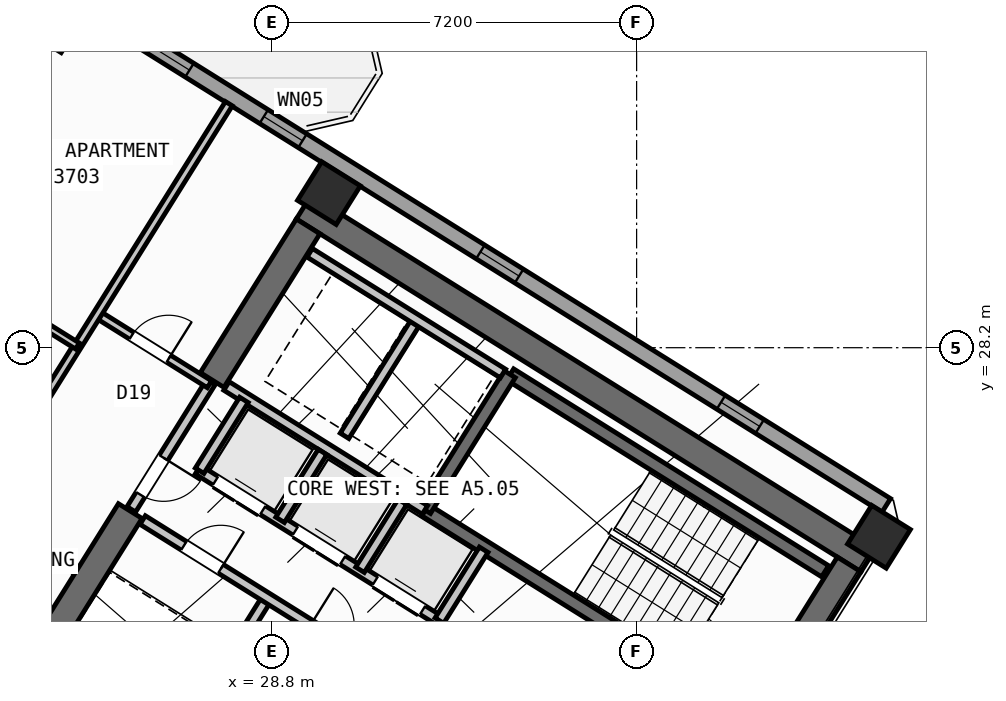
"""IFC4 building model, lengths in metres.
Left out: names, types, materials, properties, quantities, classifications, styles, units other than length and angle.
Written with IfcOpenShell. Run it as: python <this file> out.ifc"""

import sys

from ifc_helpers import new_model, si_unit, direction, frame, frame_2d, origin, origin_2d, place, context, subcontext, project, spatial, rectangle, hollow_rectangle, extrude, source, transform, mapped, element, fill, save


model = new_model("IFC4")
c1 = context("Model", 3, precision=1e-05, world=origin(), true_north=direction((0.0, 1.0)))
c2 = subcontext(c1, "Body", "Model", "MODEL_VIEW")
j1 = project(units=[si_unit("LENGTHUNIT", "METRE"), si_unit("PLANEANGLEUNIT", "RADIAN")], contexts=[c1])
p1 = place(None, origin())
s1 = spatial("IfcSite", under=j1, at=p1, CompositionType="ELEMENT")
p2 = place(p1, origin())
s2 = spatial("IfcBuilding", under=s1, at=p2, CompositionType="ELEMENT")
p3 = place(p2, frame((0.0, 0.0, 147.9)))
s3 = spatial("IfcBuildingStorey", under=s2, at=p3, CompositionType="ELEMENT", Elevation=147.9)
p4 = place(p3, frame((40.573, 24.01, 0.0), z_axis=(0.0, 0.0, 1.0), x_axis=(-0.848047359947, 0.529920442413, 0.0)))
e1 = element("IfcWall", 1, at=p4, inside=s3, PredefinedType="SHEAR", context=c2, shape_type="SweptSolid", body=[
    extrude(rectangle(XDim=13.14, YDim=0.55, at=frame_2d((6.57, 0.0))), origin(), (0.0, 0.0, 1.0), 3.35),
])
p5 = place(p3, frame((40.194, 23.922, 0.0), z_axis=(0.0, 0.0, 1.0), x_axis=(-0.529888438328, -0.848067357541, 0.0)))
e2 = element("IfcWall", 2, at=p5, inside=s3, PredefinedType="SHEAR", context=c2, shape_type="SweptSolid", body=[
    extrude(rectangle(XDim=3.575, YDim=0.55, at=frame_2d((1.788, 0.0))), origin(), (0.0, 0.0, 1.0), 3.35),
])
p6 = place(p3, frame((29.517, 30.594, 0.0), z_axis=(0.0, 0.0, 1.0), x_axis=(-0.529906864564, -0.848055844204, 0.0)))
e3 = element("IfcWall", 3, at=p6, inside=s3, PredefinedType="SHEAR", context=c2, shape_type="SweptSolid", body=[
    extrude(rectangle(XDim=3.575, YDim=0.55, at=frame_2d((1.788, 0.0))), origin(), (0.0, 0.0, 1.0), 3.35),
])
p7 = place(p3, frame((26.007, 24.976, 0.0), z_axis=(0.0, 0.0, 1.0), x_axis=(-0.529923795287, -0.848045264823, 0.0)))
e4 = element("IfcWall", 4, at=p7, inside=s3, PredefinedType="SHEAR", context=c2, shape_type="SweptSolid", body=[
    extrude(rectangle(XDim=6.425, YDim=0.55, at=frame_2d((3.212, 0.0))), origin(), (0.0, 0.0, 1.0), 3.35),
])
m1 = source(origin(), c2, "Body", "SweptSolid", [
    extrude(hollow_rectangle(XDim=0.9, YDim=0.9, WallThickness=0.036, at=origin_2d()), origin(), (0.0, 0.0, 1.0), 3.6),
])
for number, where, z_axis, x_axis in (
    (5, (40.783, 24.469, 0.0), (0.0, 0.0, 1.0), (-0.848, 0.53, 0.0)),
    (6, (29.928, 31.251, 0.0), (0.0, 0.0, 1.0), (-0.848, 0.53, 0.0)),
    (7, (24.5, 34.643, 0.0), (0.0, 0.0, 1.0), (-0.848, 0.53, 0.0)),
):
    element("IfcColumn", number, at=place(p3, frame(where, z_axis=z_axis, x_axis=x_axis)), inside=s3, PredefinedType="COLUMN", context=c2, shape_type="MappedRepresentation", body=[
        mapped(m1, transform((0.0, 0.0, 0.0), scale=1.0)),
    ])
p8 = place(p3, frame((29.268, 6.429, 0.0), z_axis=(0.0, 0.0, 1.0), x_axis=(-0.848049971435, 0.529916263149, 0.0)))
e8 = element("IfcWall", 8, at=p8, inside=s3, PredefinedType="STANDARD", context=c2, shape_type="SweptSolid", body=[
    extrude(rectangle(XDim=31.588, YDim=0.32, at=frame_2d((15.794, 0.0))), origin(), (0.0, 0.0, 1.0), 3.35),
])
p9 = place(p8, frame((16.362, 0.0, 0.0)))
e9 = element("IfcOpeningElement", 9, at=p9, cuts=e8, PredefinedType="OPENING", context=c2, shape_type="SweptSolid", body=[
    extrude(rectangle(XDim=1.2, YDim=2.15, at=frame_2d((0.6, 1.075))), frame((0.0, 0.17, 0.0), z_axis=(0.0, -1.0, 0.0), x_axis=(1.0, 0.0, 0.0)), (0.0, 0.0, 1.0), 0.34),
])
p10 = place(p8, frame((2.989, 0.0, 0.8)))
e10 = element("IfcOpeningElement", 10, at=p10, cuts=e8, PredefinedType="OPENING", context=c2, shape_type="SweptSolid", body=[
    extrude(rectangle(XDim=2.1, YDim=1.55, at=frame_2d((1.05, 0.775))), frame((0.0, 0.17, 0.0), z_axis=(0.0, -1.0, 0.0), x_axis=(1.0, 0.0, 0.0)), (0.0, 0.0, 1.0), 0.34),
])
p11 = place(p8, frame((8.359, 0.0, 0.8)))
e11 = element("IfcOpeningElement", 11, at=p11, cuts=e8, PredefinedType="OPENING", context=c2, shape_type="SweptSolid", body=[
    extrude(rectangle(XDim=2.1, YDim=1.55, at=frame_2d((1.05, 0.775))), frame((0.0, 0.17, 0.0), z_axis=(0.0, -1.0, 0.0), x_axis=(1.0, 0.0, 0.0)), (0.0, 0.0, 1.0), 0.34),
])
p12 = place(p8, frame((13.284, 0.0, 0.95)))
e12 = element("IfcOpeningElement", 12, at=p12, cuts=e8, PredefinedType="OPENING", context=c2, shape_type="SweptSolid", body=[
    extrude(rectangle(XDim=1.2, YDim=1.4, at=frame_2d((0.6, 0.7))), frame((0.0, 0.17, 0.0), z_axis=(0.0, -1.0, 0.0), x_axis=(1.0, 0.0, 0.0)), (0.0, 0.0, 1.0), 0.34),
])
p13 = place(p8, frame((29.188, 0.0, 0.95)))
e13 = element("IfcOpeningElement", 13, at=p13, cuts=e8, PredefinedType="OPENING", context=c2, shape_type="SweptSolid", body=[
    extrude(rectangle(XDim=1.2, YDim=1.4, at=frame_2d((0.6, 0.7))), frame((0.0, 0.17, 0.0), z_axis=(0.0, -1.0, 0.0), x_axis=(1.0, 0.0, 0.0)), (0.0, 0.0, 1.0), 0.34),
])
p14 = place(p8, frame((19.674, 0.0, 1.0)))
e14 = element("IfcOpeningElement", 14, at=p14, cuts=e8, PredefinedType="OPENING", context=c2, shape_type="SweptSolid", body=[
    extrude(rectangle(XDim=0.9, YDim=1.25, at=frame_2d((0.45, 0.625))), frame((0.0, 0.17, 0.0), z_axis=(0.0, -1.0, 0.0), x_axis=(1.0, 0.0, 0.0)), (0.0, 0.0, 1.0), 0.34),
])
p15 = place(p8, frame((21.896, 0.0, 1.0)))
e15 = element("IfcOpeningElement", 15, at=p15, cuts=e8, PredefinedType="OPENING", context=c2, shape_type="SweptSolid", body=[
    extrude(rectangle(XDim=0.9, YDim=1.25, at=frame_2d((0.45, 0.625))), frame((0.0, 0.17, 0.0), z_axis=(0.0, -1.0, 0.0), x_axis=(1.0, 0.0, 0.0)), (0.0, 0.0, 1.0), 0.34),
])
p16 = place(p8, frame((24.106, 0.0, 1.0)))
e16 = element("IfcOpeningElement", 16, at=p16, cuts=e8, PredefinedType="OPENING", context=c2, shape_type="SweptSolid", body=[
    extrude(rectangle(XDim=0.65, YDim=1.15, at=frame_2d((0.325, 0.575))), frame((0.0, 0.17, 0.0), z_axis=(0.0, -1.0, 0.0), x_axis=(1.0, 0.0, 0.0)), (0.0, 0.0, 1.0), 0.34),
])
p17 = place(p8, frame((26.366, 0.0, 1.0)))
e17 = element("IfcOpeningElement", 17, at=p17, cuts=e8, PredefinedType="OPENING", context=c2, shape_type="SweptSolid", body=[
    extrude(rectangle(XDim=0.9, YDim=1.25, at=frame_2d((0.45, 0.625))), frame((0.0, 0.17, 0.0), z_axis=(0.0, -1.0, 0.0), x_axis=(1.0, 0.0, 0.0)), (0.0, 0.0, 1.0), 0.34),
])
p18 = place(p3, frame((14.138, 41.825, 0.0), z_axis=(0.0, 0.0, 1.0), x_axis=(0.848046498049, -0.529921821731, 0.0)))
e18 = element("IfcWall", 18, at=p18, inside=s3, PredefinedType="STANDARD", context=c2, shape_type="SweptSolid", body=[
    extrude(rectangle(XDim=31.588, YDim=0.32, at=frame_2d((15.794, 0.0))), origin(), (0.0, 0.0, 1.0), 3.35),
])
p19 = place(p18, frame((2.949, 0.0, 0.0)))
e19 = element("IfcOpeningElement", 19, at=p19, cuts=e18, PredefinedType="OPENING", context=c2, shape_type="SweptSolid", body=[
    extrude(rectangle(XDim=1.05, YDim=2.15, at=frame_2d((0.525, 1.075))), frame((0.0, 0.17, 0.0), z_axis=(0.0, -1.0, 0.0), x_axis=(1.0, 0.0, 0.0)), (0.0, 0.0, 1.0), 0.34),
])
p20 = place(p18, frame((0.861, 0.0, 0.85)))
e20 = element("IfcOpeningElement", 20, at=p20, cuts=e18, PredefinedType="OPENING", context=c2, shape_type="SweptSolid", body=[
    extrude(rectangle(XDim=1.5, YDim=1.5, at=frame_2d((0.75, 0.75))), frame((0.0, 0.17, 0.0), z_axis=(0.0, -1.0, 0.0), x_axis=(1.0, 0.0, 0.0)), (0.0, 0.0, 1.0), 0.34),
])
p21 = place(p18, frame((8.494, 0.0, 0.85)))
e21 = element("IfcOpeningElement", 21, at=p21, cuts=e18, PredefinedType="OPENING", context=c2, shape_type="SweptSolid", body=[
    extrude(rectangle(XDim=1.8, YDim=1.5, at=frame_2d((0.9, 0.75))), frame((0.0, 0.17, 0.0), z_axis=(0.0, -1.0, 0.0), x_axis=(1.0, 0.0, 0.0)), (0.0, 0.0, 1.0), 0.34),
])
p22 = place(p18, frame((13.874, 0.0, 0.85)))
e22 = element("IfcOpeningElement", 22, at=p22, cuts=e18, PredefinedType="OPENING", context=c2, shape_type="SweptSolid", body=[
    extrude(rectangle(XDim=1.5, YDim=1.5, at=frame_2d((0.75, 0.75))), frame((0.0, 0.17, 0.0), z_axis=(0.0, -1.0, 0.0), x_axis=(1.0, 0.0, 0.0)), (0.0, 0.0, 1.0), 0.34),
])
p23 = place(p18, frame((17.104, 0.0, 1.0)))
e23 = element("IfcOpeningElement", 23, at=p23, cuts=e18, PredefinedType="OPENING", context=c2, shape_type="SweptSolid", body=[
    extrude(rectangle(XDim=0.9, YDim=1.25, at=frame_2d((0.45, 0.625))), frame((0.0, 0.17, 0.0), z_axis=(0.0, -1.0, 0.0), x_axis=(1.0, 0.0, 0.0)), (0.0, 0.0, 1.0), 0.34),
])
p24 = place(p18, frame((22.144, 0.0, 1.0)))
e24 = element("IfcOpeningElement", 24, at=p24, cuts=e18, PredefinedType="OPENING", context=c2, shape_type="SweptSolid", body=[
    extrude(rectangle(XDim=0.9, YDim=1.25, at=frame_2d((0.45, 0.625))), frame((0.0, 0.17, 0.0), z_axis=(0.0, -1.0, 0.0), x_axis=(1.0, 0.0, 0.0)), (0.0, 0.0, 1.0), 0.34),
])
p25 = place(p18, frame((27.744, 0.0, 1.0)))
e25 = element("IfcOpeningElement", 25, at=p25, cuts=e18, PredefinedType="OPENING", context=c2, shape_type="SweptSolid", body=[
    extrude(rectangle(XDim=0.9, YDim=1.25, at=frame_2d((0.45, 0.625))), frame((0.0, 0.17, 0.0), z_axis=(0.0, -1.0, 0.0), x_axis=(1.0, 0.0, 0.0)), (0.0, 0.0, 1.0), 0.34),
])
p26 = place(p3, frame((39.721, 23.788, 0.0), z_axis=(0.0, 0.0, 1.0), x_axis=(-0.848054434086, 0.529909121291, 0.0)))
e26 = element("IfcWall", 26, at=p26, inside=s3, PredefinedType="SHEAR", context=c2, shape_type="SweptSolid", body=[
    extrude(rectangle(XDim=7.33, YDim=0.26, at=frame_2d((3.665, 0.0))), origin(), (0.0, 0.0, 1.0), 3.35),
])
p27 = place(p3, frame((38.046, 21.108, 0.0), z_axis=(0.0, 0.0, 1.0), x_axis=(-0.848054434086, 0.529909121291, 0.0)))
e27 = element("IfcWall", 27, at=p27, inside=s3, PredefinedType="SHEAR", context=c2, shape_type="SweptSolid", body=[
    extrude(rectangle(XDim=7.33, YDim=0.26, at=frame_2d((3.665, 0.0))), origin(), (0.0, 0.0, 1.0), 3.35),
])
p28 = place(p27, frame((0.22, 0.0, 0.0)))
e28 = element("IfcOpeningElement", 28, at=p28, cuts=e27, PredefinedType="OPENING", context=c2, shape_type="SweptSolid", body=[
    extrude(rectangle(XDim=1.1, YDim=2.1, at=frame_2d((0.55, 1.05))), frame((0.0, 0.14, 0.0), z_axis=(0.0, -1.0, 0.0), x_axis=(1.0, 0.0, 0.0)), (0.0, 0.0, 1.0), 0.28),
])
p29 = place(p3, frame((33.496, 27.677, 0.0), z_axis=(0.0, 0.0, 1.0), x_axis=(-0.529908658664, -0.84805472316, 0.0)))
e29 = element("IfcWall", 29, at=p29, inside=s3, PredefinedType="SHEAR", context=c2, shape_type="SweptSolid", body=[
    extrude(rectangle(XDim=3.16, YDim=0.26, at=frame_2d((1.58, 0.0))), origin(), (0.0, 0.0, 1.0), 3.35),
])
p30 = place(p3, frame((31.822, 24.998, 0.0), z_axis=(0.0, 0.0, 1.0), x_axis=(-0.848036912365, 0.52993716162, 0.0)))
e30 = element("IfcWall", 30, at=p30, inside=s3, PredefinedType="STANDARD", context=c2, shape_type="SweptSolid", body=[
    extrude(rectangle(XDim=4.618, YDim=0.2, at=frame_2d((2.309, 0.0))), origin(), (0.0, 0.0, 1.0), 3.34),
])
p31 = place(p3, frame((32.108, 22.814, 0.0), z_axis=(0.0, 0.0, 1.0), x_axis=(-0.848042229521, 0.529928652696, 0.0)))
e31 = element("IfcWall", 31, at=p31, inside=s3, PredefinedType="STANDARD", context=c2, shape_type="SweptSolid", body=[
    extrude(rectangle(XDim=5.62, YDim=0.2, at=frame_2d((2.81, 0.0))), origin(), (0.0, 0.0, 1.0), 3.34),
])
p32 = place(p31, frame((0.39, 0.0, 0.0)))
e32 = element("IfcOpeningElement", 32, at=p32, cuts=e31, PredefinedType="OPENING", context=c2, shape_type="SweptSolid", body=[
    extrude(rectangle(XDim=1.1, YDim=2.15, at=frame_2d((0.55, 1.075))), frame((0.0, 0.11, 0.0), z_axis=(0.0, -1.0, 0.0), x_axis=(1.0, 0.0, 0.0)), (0.0, 0.0, 1.0), 0.22),
])
p33 = place(p31, frame((2.25, 0.0, 0.0)))
e33 = element("IfcOpeningElement", 33, at=p33, cuts=e31, PredefinedType="OPENING", context=c2, shape_type="SweptSolid", body=[
    extrude(rectangle(XDim=1.1, YDim=2.15, at=frame_2d((0.55, 1.075))), frame((0.0, 0.11, 0.0), z_axis=(0.0, -1.0, 0.0), x_axis=(1.0, 0.0, 0.0)), (0.0, 0.0, 1.0), 0.22),
])
p34 = place(p31, frame((4.11, 0.0, 0.0)))
e34 = element("IfcOpeningElement", 34, at=p34, cuts=e31, PredefinedType="OPENING", context=c2, shape_type="SweptSolid", body=[
    extrude(rectangle(XDim=1.1, YDim=2.15, at=frame_2d((0.55, 1.075))), frame((0.0, 0.11, 0.0), z_axis=(0.0, -1.0, 0.0), x_axis=(1.0, 0.0, 0.0)), (0.0, 0.0, 1.0), 0.22),
])
p35 = place(p3, frame((32.982, 24.213, 0.0), z_axis=(0.0, 0.0, 1.0), x_axis=(-0.529839334948, -0.84809803628, 0.0)))
e35 = element("IfcWall", 35, at=p35, inside=s3, PredefinedType="STANDARD", context=c2, shape_type="SweptSolid", body=[
    extrude(rectangle(XDim=1.65, YDim=0.2, at=frame_2d((0.825, 0.0))), origin(), (0.0, 0.0, 1.0), 3.34),
])
p36 = place(p3, frame((28.25, 27.17, 0.0), z_axis=(0.0, 0.0, 1.0), x_axis=(-0.529905827651, -0.848056492117, 0.0)))
e36 = element("IfcWall", 36, at=p36, inside=s3, PredefinedType="STANDARD", context=c2, shape_type="SweptSolid", body=[
    extrude(rectangle(XDim=1.65, YDim=0.2, at=frame_2d((0.825, 0.0))), origin(), (0.0, 0.0, 1.0), 3.34),
])
p37 = place(p3, frame((31.645, 28.716, 0.0), z_axis=(0.0, 0.0, 1.0), x_axis=(-0.52986693015, -0.848080795876, 0.0)))
e37 = element("IfcWall", 37, at=p37, inside=s3, PredefinedType="STANDARD", context=c2, shape_type="SweptSolid", body=[
    extrude(rectangle(XDim=2.66, YDim=0.2, at=frame_2d((1.33, 0.0))), origin(), (0.0, 0.0, 1.0), 3.34),
])
p38 = place(p3, frame((33.363, 27.69, 0.0), z_axis=(0.0, 0.0, 1.0), x_axis=(-0.848047090064, 0.529920874315, 0.0)))
e38 = element("IfcWall", 38, at=p38, inside=s3, PredefinedType="STANDARD", context=c2, shape_type="SweptSolid", body=[
    extrude(rectangle(XDim=4.498, YDim=0.2, at=frame_2d((2.249, 0.0))), origin(), (0.0, 0.0, 1.0), 3.34),
])
for number, where, z_axis, x_axis in (
    (39, (31.379, 25.156, 0.0), (0.0, 0.0, 1.0), (-0.53, -0.848, 0.0)),
    (40, (29.801, 26.142, 0.0), (0.0, 0.0, 1.0), (-0.53, -0.848, 0.0)),
):
    element("IfcWall", number, at=place(p3, frame(where, z_axis=z_axis, x_axis=x_axis)), inside=s3, PredefinedType="STANDARD", context=c2, shape_type="SweptSolid", body=[
        extrude(rectangle(XDim=1.58, YDim=0.2, at=frame_2d((0.79, 0.0))), origin(), (0.0, 0.0, 1.0), 3.34),
    ])
p39 = place(p3, frame((28.71, 23.263, 0.0), z_axis=(0.0, 0.0, 1.0), x_axis=(-0.529907497854, -0.848055448493, 0.0)))
e41 = element("IfcWall", 41, at=p39, inside=s3, PredefinedType="STANDARD", context=c2, shape_type="SweptSolid", body=[
    extrude(rectangle(XDim=2.88, YDim=0.2, at=frame_2d((1.44, 0.0))), origin(), (0.0, 0.0, 1.0), 3.34),
])
p40 = place(p3, frame((31.525, 21.504, 0.0), z_axis=(0.0, 0.0, 1.0), x_axis=(-0.848040211232, 0.529931882541, 0.0)))
e42 = element("IfcWall", 42, at=p40, inside=s3, PredefinedType="STANDARD", context=c2, shape_type="SweptSolid", body=[
    extrude(rectangle(XDim=6.218, YDim=0.2, at=frame_2d((3.109, 0.0))), origin(), (0.0, 0.0, 1.0), 3.34),
])
p41 = place(p40, frame((4.4, 0.0, 0.0)))
e43 = element("IfcOpeningElement", 43, at=p41, cuts=e42, PredefinedType="OPENING", context=c2, shape_type="SweptSolid", body=[
    extrude(rectangle(XDim=0.86, YDim=2.05, at=frame_2d((0.43, 1.025))), frame((0.0, 0.11, 0.0), z_axis=(0.0, -1.0, 0.0), x_axis=(1.0, 0.0, 0.0)), (0.0, 0.0, 1.0), 0.22),
])
p42 = place(p40, frame((1.45, 0.0, 0.0)))
e44 = element("IfcOpeningElement", 44, at=p42, cuts=e42, PredefinedType="OPENING", context=c2, shape_type="SweptSolid", body=[
    extrude(rectangle(XDim=0.86, YDim=2.05, at=frame_2d((0.43, 1.025))), frame((0.0, 0.11, 0.0), z_axis=(0.0, -1.0, 0.0), x_axis=(1.0, 0.0, 0.0)), (0.0, 0.0, 1.0), 0.22),
])
p43 = place(p3, frame((27.596, 27.52, 0.0), z_axis=(0.0, 0.0, 1.0), x_axis=(-0.529865479138, -0.848081702443, 0.0)))
e45 = element("IfcWall", 45, at=p43, inside=s3, PredefinedType="STANDARD", context=c2, shape_type="SweptSolid", body=[
    extrude(rectangle(XDim=2.96, YDim=0.2, at=frame_2d((1.48, 0.0))), origin(), (0.0, 0.0, 1.0), 3.34),
])
p44 = place(p43, frame((1.76, 0.0, 0.0)))
e46 = element("IfcOpeningElement", 46, at=p44, cuts=e45, PredefinedType="OPENING", context=c2, shape_type="SweptSolid", body=[
    extrude(rectangle(XDim=0.86, YDim=2.05, at=frame_2d((0.43, 1.025))), frame((0.0, 0.11, 0.0), z_axis=(0.0, -1.0, 0.0), x_axis=(1.0, 0.0, 0.0)), (0.0, 0.0, 1.0), 0.22),
])
p45 = place(p3, frame((27.57, 27.478, 0.0), z_axis=(0.0, 0.0, 1.0), x_axis=(-0.848050851465, 0.529914854792, 0.0)))
e47 = element("IfcWall", 47, at=p45, inside=s3, PredefinedType="PARTITIONING", context=c2, shape_type="SweptSolid", body=[
    extrude(rectangle(XDim=2.61, YDim=0.16, at=frame_2d((1.305, 0.0))), origin(), (0.0, 0.0, 1.0), 3.34),
])
p46 = place(p45, frame((0.95, 0.0, 0.0)))
e48 = element("IfcOpeningElement", 48, at=p46, cuts=e47, PredefinedType="OPENING", context=c2, shape_type="SweptSolid", body=[
    extrude(rectangle(XDim=0.86, YDim=2.05, at=frame_2d((0.43, 1.025))), frame((0.0, 0.09, 0.0), z_axis=(0.0, -1.0, 0.0), x_axis=(1.0, 0.0, 0.0)), (0.0, 0.0, 1.0), 0.18),
])
p47 = place(p3, frame((27.953, 33.016, 0.0), z_axis=(0.0, 0.0, 1.0), x_axis=(-0.529903001606, -0.848058257957, 0.0)))
e49 = element("IfcWall", 49, at=p47, inside=s3, PredefinedType="PARTITIONING", context=c2, shape_type="SweptSolid", body=[
    extrude(rectangle(XDim=9.15, YDim=0.16, at=frame_2d((4.575, 0.0))), origin(), (0.0, 0.0, 1.0), 3.34),
])
p48 = place(p3, frame((24.964, 28.233, 0.0), z_axis=(0.0, 0.0, 1.0), x_axis=(-0.848059820872, 0.529900500304, 0.0)))
e50 = element("IfcWall", 50, at=p48, inside=s3, PredefinedType="PLUMBINGWALL", context=c2, shape_type="SweptSolid", body=[
    extrude(rectangle(XDim=3.79, YDim=0.14, at=frame_2d((1.895, 0.0))), origin(), (0.0, 0.0, 1.0), 3.34),
])
p49 = place(p48, frame((2.23, 0.0, 0.0)))
e51 = element("IfcOpeningElement", 51, at=p49, cuts=e50, PredefinedType="OPENING", context=c2, shape_type="SweptSolid", body=[
    extrude(rectangle(XDim=0.92, YDim=2.08, at=frame_2d((0.46, 1.04))), frame((0.0, 0.08, 0.0), z_axis=(0.0, -1.0, 0.0), x_axis=(1.0, 0.0, 0.0)), (0.0, 0.0, 1.0), 0.16),
])
m2 = source(origin(), c2, "Body", "SweptSolid", [
    extrude(rectangle(XDim=1.5, YDim=1.5, at=frame_2d((0.75, 0.75))), frame((0.0, 0.03, 0.0), z_axis=(0.0, -1.0, 0.0), x_axis=(1.0, 0.0, 0.0)), (0.0, 0.0, 1.0), 0.06),
])
p50 = place(p22, origin())
e52 = element("IfcWindow", 52, at=p50, inside=s3, PartitioningType="SINGLE_PANEL", PredefinedType="WINDOW", context=c2, shape_type="MappedRepresentation", body=[
    mapped(m2, transform((0.0, 0.0, 0.0), scale=1.0)),
])
fill(e22, e52)
m3 = source(origin(), c2, "Body", "SweptSolid", [
    extrude(rectangle(XDim=0.9, YDim=1.25, at=frame_2d((0.45, 0.625))), frame((0.0, 0.03, 0.0), z_axis=(0.0, -1.0, 0.0), x_axis=(1.0, 0.0, 0.0)), (0.0, 0.0, 1.0), 0.06),
])
p51 = place(p23, origin())
e53 = element("IfcWindow", 53, at=p51, inside=s3, PartitioningType="SINGLE_PANEL", PredefinedType="WINDOW", context=c2, shape_type="MappedRepresentation", body=[
    mapped(m3, transform((0.0, 0.0, 0.0), scale=1.0)),
])
fill(e23, e53)
p52 = place(p24, origin())
e54 = element("IfcWindow", 54, at=p52, inside=s3, PartitioningType="SINGLE_PANEL", PredefinedType="WINDOW", context=c2, shape_type="MappedRepresentation", body=[
    mapped(m3, transform((0.0, 0.0, 0.0), scale=1.0)),
])
fill(e24, e54)
p53 = place(p25, origin())
e55 = element("IfcWindow", 55, at=p53, inside=s3, PartitioningType="SINGLE_PANEL", PredefinedType="WINDOW", context=c2, shape_type="MappedRepresentation", body=[
    mapped(m3, transform((0.0, 0.0, 0.0), scale=1.0)),
])
fill(e25, e55)
m4 = source(origin(), c2, "Body", "SweptSolid", [
    extrude(rectangle(XDim=1.1, YDim=2.15, at=frame_2d((0.55, 1.075))), frame((0.0, 0.025, 0.0), z_axis=(0.0, -1.0, 0.0), x_axis=(1.0, 0.0, 0.0)), (0.0, 0.0, 1.0), 0.05),
])
p54 = place(p32, origin())
e56 = element("IfcDoor", 56, at=p54, inside=s3, OperationType="DOUBLE_DOOR_SLIDING", PredefinedType="DOOR", context=c2, shape_type="MappedRepresentation", body=[
    mapped(m4, transform((0.0, 0.0, 0.0), scale=1.0)),
])
fill(e32, e56)
p55 = place(p33, origin())
e57 = element("IfcDoor", 57, at=p55, inside=s3, OperationType="DOUBLE_DOOR_SLIDING", PredefinedType="DOOR", context=c2, shape_type="MappedRepresentation", body=[
    mapped(m4, transform((0.0, 0.0, 0.0), scale=1.0)),
])
fill(e33, e57)
p56 = place(p34, origin())
e58 = element("IfcDoor", 58, at=p56, inside=s3, OperationType="DOUBLE_DOOR_SLIDING", PredefinedType="DOOR", context=c2, shape_type="MappedRepresentation", body=[
    mapped(m4, transform((0.0, 0.0, 0.0), scale=1.0)),
])
fill(e34, e58)
m5 = source(origin(), c2, "Body", "SweptSolid", [
    extrude(rectangle(XDim=0.86, YDim=2.05, at=frame_2d((0.43, 1.025))), frame((0.0, 0.025, 0.0), z_axis=(0.0, -1.0, 0.0), x_axis=(1.0, 0.0, 0.0)), (0.0, 0.0, 1.0), 0.05),
])
p57 = place(p41, frame((0.86, 0.0, 0.0), z_axis=(0.0, 0.0, 1.0), x_axis=(-1.0, 0.0, 0.0)))
e59 = element("IfcDoor", 59, at=p57, inside=s3, OperationType="SINGLE_SWING_RIGHT", PredefinedType="DOOR", context=c2, shape_type="MappedRepresentation", body=[
    mapped(m5, transform((0.0, 0.0, 0.0), scale=1.0)),
])
fill(e43, e59)
p58 = place(p46, frame((0.86, 0.0, 0.0), z_axis=(0.0, 0.0, 1.0), x_axis=(-1.0, 0.0, 0.0)))
e60 = element("IfcDoor", 60, at=p58, inside=s3, OperationType="SINGLE_SWING_RIGHT", PredefinedType="DOOR", context=c2, shape_type="MappedRepresentation", body=[
    mapped(m5, transform((0.0, 0.0, 0.0), scale=1.0)),
])
fill(e48, e60)
p59 = place(p44, origin())
e61 = element("IfcDoor", 61, at=p59, inside=s3, OperationType="SINGLE_SWING_LEFT", PredefinedType="DOOR", context=c2, shape_type="MappedRepresentation", body=[
    mapped(m5, transform((0.0, 0.0, 0.0), scale=1.0)),
])
fill(e46, e61)
save(model, sys.argv[1])
